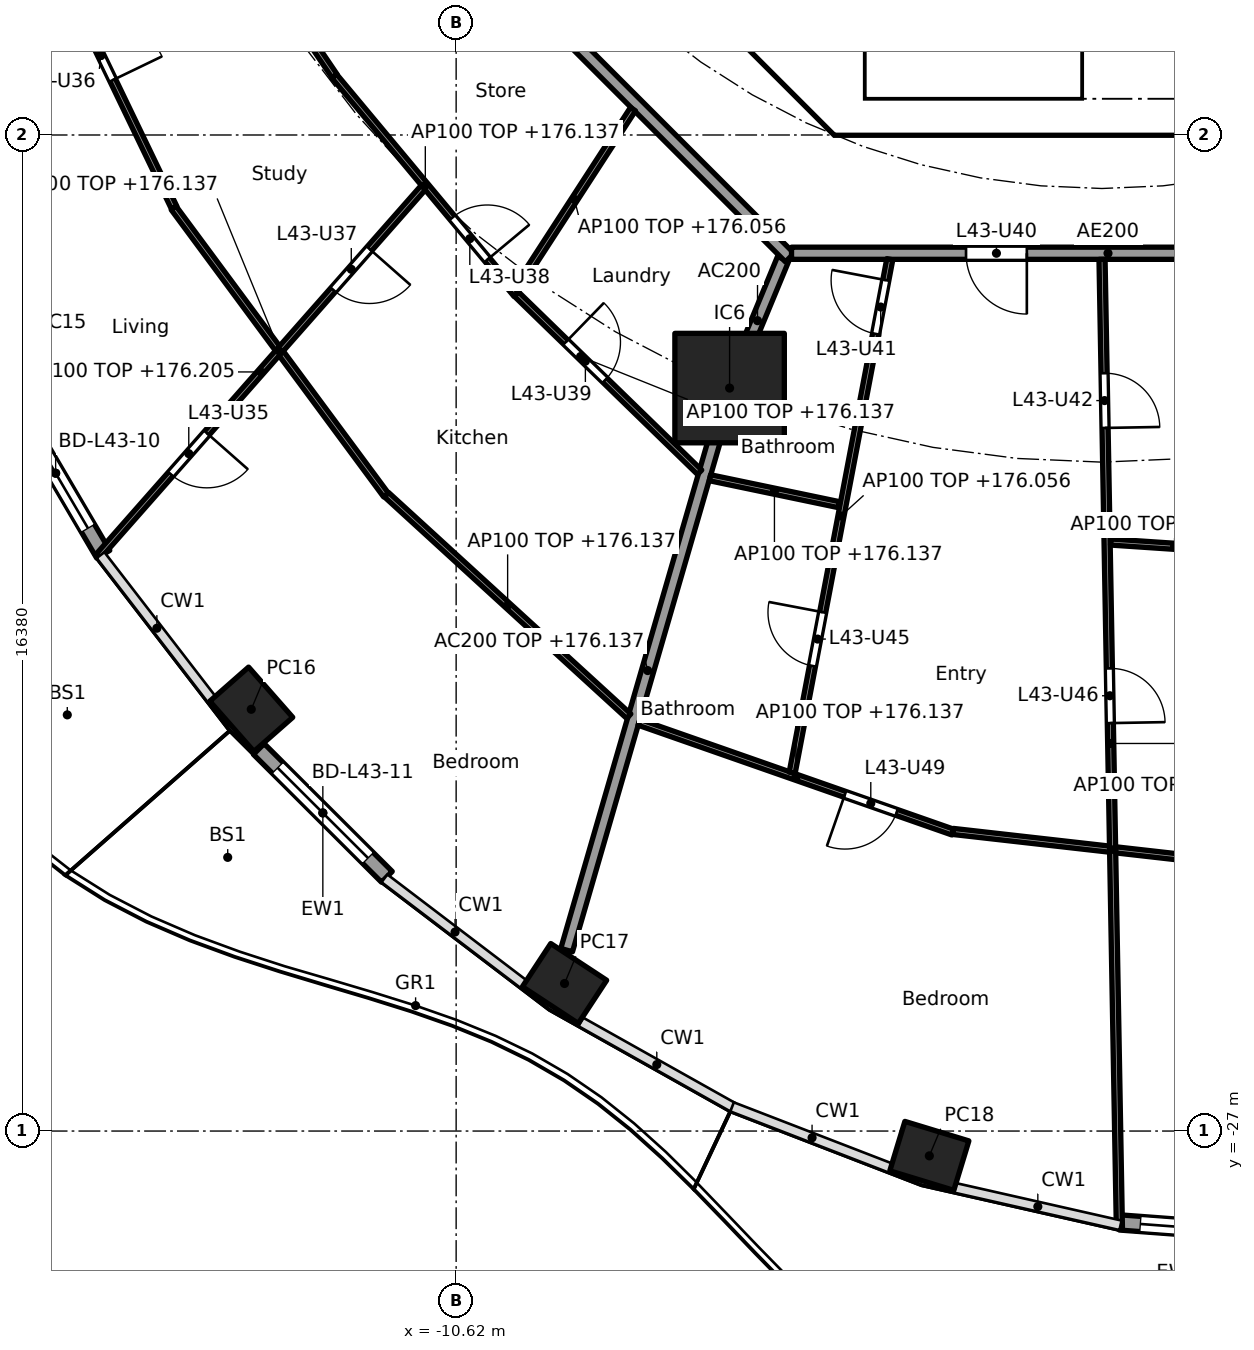
"""IFC4 building model, lengths in metres.
Left out: names, types, materials, properties, quantities, classifications, styles, units other than length and angle.
Written with IfcOpenShell. Run it as: python <this file> out.ifc"""

import sys

from ifc_helpers import new_model, si_unit, direction, frame, frame_2d, origin, origin_2d, place, context, subcontext, project, spatial, polyline, rectangle, hollow_rectangle, outline, extrude, element, fill, save


model = new_model("IFC4")
c1 = context("Model", 3, precision=1e-05, world=origin(), true_north=direction((0.0, 1.0)))
c2 = subcontext(c1, "Body", "Model", "MODEL_VIEW")
j1 = project(units=[si_unit("LENGTHUNIT", "METRE"), si_unit("PLANEANGLEUNIT", "RADIAN")], contexts=[c1])
p1 = place(None, origin())
s1 = spatial("IfcSite", under=j1, at=p1, CompositionType="ELEMENT")
p2 = place(p1, origin())
s2 = spatial("IfcBuilding", under=s1, at=p2, CompositionType="ELEMENT")
p3 = place(p2, frame((0.0, 0.0, 173.3)))
s3 = spatial("IfcBuildingStorey", under=s2, at=p3, CompositionType="ELEMENT", Elevation=173.3)
for number, where, z_axis, x_axis in (
    (1, (-13.989, -20.064, 0.0), (0.0, 0.0, 1.0), (0.66, -0.751, 0.0)),
    (2, (-8.837, -24.573, 0.0), (0.0, 0.0, 1.0), (0.836, -0.549, 0.0)),
    (3, (-2.838, -27.408, 0.0), (0.0, 0.0, 1.0), (0.957, -0.292, 0.0)),
):
    element("IfcColumn", number, at=place(p3, frame(where, z_axis=z_axis, x_axis=x_axis)), inside=s3, PredefinedType="COLUMN", context=c2, shape_type="SweptSolid", body=[
        extrude(hollow_rectangle(XDim=1.1, YDim=0.85, WallThickness=0.036, at=origin_2d()), origin(), (0.0, 0.0, 1.0), 3.7),
    ])
p4 = place(p3, frame((-6.123, -14.782, 0.0), z_axis=(0.0, 0.0, 1.0), x_axis=(1.0, 0.0, 0.0)))
e4 = element("IfcColumn", 4, at=p4, inside=s3, PredefinedType="COLUMN", context=c2, shape_type="SweptSolid", body=[
    extrude(rectangle(XDim=1.8, YDim=1.8, at=origin_2d()), origin(), (0.0, 0.0, 1.0), 3.7),
])
p5 = place(p3, frame((-16.424, -17.515, 0.0), z_axis=(0.0, 0.0, 1.0), x_axis=(-0.506309086483, 0.862352079458, 0.0)))
e5 = element("IfcWall", 5, at=p5, inside=s3, PredefinedType="SOLIDWALL", context=c2, shape_type="SweptSolid", body=[
    extrude(rectangle(XDim=3.092, YDim=0.25, at=frame_2d((1.546, 0.0))), origin(), (0.0, 0.0, 1.0), 3.44),
])
p6 = place(p5, frame((0.496, 0.0, 0.0)))
e6 = element("IfcOpeningElement", 6, at=p6, cuts=e5, PredefinedType="OPENING", context=c2, shape_type="SweptSolid", body=[
    extrude(rectangle(XDim=2.1, YDim=2.4, at=frame_2d((1.05, 1.2))), frame((0.0, 0.135, 0.0), z_axis=(0.0, -1.0, 0.0), x_axis=(1.0, 0.0, 0.0)), (0.0, 0.0, 1.0), 0.27),
])
p7 = place(p3, frame((-11.759, -22.82, 0.0), z_axis=(0.0, 0.0, 1.0), x_axis=(-0.707844845069, 0.706367946122, 0.0)))
e7 = element("IfcWall", 7, at=p7, inside=s3, PredefinedType="SOLIDWALL", context=c2, shape_type="SweptSolid", body=[
    extrude(rectangle(XDim=2.976, YDim=0.25, at=frame_2d((1.488, 0.0))), origin(), (0.0, 0.0, 1.0), 3.44),
])
p8 = place(p7, frame((0.438, 0.0, 0.0)))
e8 = element("IfcOpeningElement", 8, at=p8, cuts=e7, PredefinedType="OPENING", context=c2, shape_type="SweptSolid", body=[
    extrude(rectangle(XDim=2.1, YDim=2.4, at=frame_2d((1.05, 1.2))), frame((0.0, 0.135, 0.0), z_axis=(0.0, -1.0, 0.0), x_axis=(1.0, 0.0, 0.0)), (0.0, 0.0, 1.0), 0.27),
])
p9 = place(p3, frame((3.061, -28.709, 0.0), z_axis=(0.0, 0.0, 1.0), x_axis=(-0.997232064422, 0.074351931305, 0.0)))
e9 = element("IfcWall", 9, at=p9, inside=s3, PredefinedType="SOLIDWALL", context=c2, shape_type="SweptSolid", body=[
    extrude(rectangle(XDim=2.771, YDim=0.25, at=frame_2d((1.386, 0.0))), origin(), (0.0, 0.0, 1.0), 3.44),
])
p10 = place(p9, frame((0.336, 0.0, 0.0)))
e10 = element("IfcOpeningElement", 10, at=p10, cuts=e9, PredefinedType="OPENING", context=c2, shape_type="SweptSolid", body=[
    extrude(rectangle(XDim=2.1, YDim=2.4, at=frame_2d((1.05, 1.2))), frame((0.0, 0.135, 0.0), z_axis=(0.0, -1.0, 0.0), x_axis=(1.0, 0.0, 0.0)), (0.0, 0.0, 1.0), 0.27),
])
p11 = place(p3, frame((-9.988, -4.613, 0.0), z_axis=(0.0, 0.0, 1.0), x_axis=(0.707106781187, -0.707106781187, 0.0)))
e11 = element("IfcWall", 11, at=p11, inside=s3, PredefinedType="SHEAR", context=c2, shape_type="SweptSolid", body=[
    extrude(rectangle(XDim=7.602, YDim=0.6, at=frame_2d((3.801, 0.0))), origin(), (0.0, 0.0, 1.0), 3.44),
])
p12 = place(p11, frame((6.151, 0.0, 0.0)))
e12 = element("IfcOpeningElement", 12, at=p12, cuts=e11, PredefinedType="OPENING", context=c2, shape_type="SweptSolid", body=[
    extrude(rectangle(XDim=1.1, YDim=2.1, at=frame_2d((0.55, 1.05))), frame((0.0, 0.31, 0.0), z_axis=(0.0, -1.0, 0.0), x_axis=(1.0, 0.0, 0.0)), (0.0, 0.0, 1.0), 0.62),
])
p13 = place(p3, origin())
e13 = element("IfcWall", 13, at=p13, inside=s3, PredefinedType="SHEAR", context=c2, shape_type="SweptSolid", body=[
    extrude(outline(polyline([(-4.152, -10.025), (4.152, -10.025), (4.401, -9.776), (4.825, -10.2), (4.401, -10.625), (-4.401, -10.625), (-4.825, -10.2), (-4.401, -9.776), (-4.152, -10.025)])), origin(), (0.0, 0.0, 1.0), 3.44),
])
p14 = place(p3, origin())
e14 = element("IfcWall", 14, at=p14, inside=s3, PredefinedType="SOLIDWALL", context=c2, shape_type="SweptSolid", body=[
    extrude(outline(polyline([(-3.9, -10.025), (-4.1, -10.025), (-4.1, -7.025), (-3.9, -7.025), (-3.9, -10.025)])), origin(), (0.0, 0.0, 1.0), 3.44),
])
p15 = place(p3, frame((-5.243, -12.657, 0.0), z_axis=(0.0, 0.0, 1.0), x_axis=(-0.382707856524, -0.923869415315, 0.0)))
e15 = element("IfcWall", 15, at=p15, inside=s3, PredefinedType="PARTITIONING", context=c2, shape_type="SweptSolid", body=[
    extrude(rectangle(XDim=2.2, YDim=0.2, at=frame_2d((1.1, 0.0))), origin(), (0.0, 0.0, 1.0), 3.44),
])
p16 = place(p3, frame((-6.137, -14.83, 0.0), z_axis=(0.0, 0.0, 1.0), x_axis=(-0.278461169897, -0.96044748782, 0.0)))
e16 = element("IfcWall", 16, at=p16, inside=s3, PredefinedType="PARTITIONING", context=c2, shape_type="SweptSolid", body=[
    extrude(rectangle(XDim=9.573, YDim=0.2, at=frame_2d((4.787, 0.0))), origin(), (0.0, 0.0, 1.0), 2.837),
])
p17 = place(p3, frame((-12.635, -5.134, 0.0), z_axis=(0.0, 0.0, 1.0), x_axis=(0.707106781187, -0.707106781187, 0.0)))
e17 = element("IfcWall", 17, at=p17, inside=s3, PredefinedType="PARTITIONING", context=c2, shape_type="SweptSolid", body=[
    extrude(rectangle(XDim=10.609, YDim=0.2, at=frame_2d((5.305, 0.0))), origin(), (0.0, 0.0, 1.0), 3.44),
])
p18 = place(p3, frame((-5.104, -12.565, 0.0), z_axis=(0.0, 0.0, 1.0), x_axis=(1.0, 0.0, 0.0)))
e18 = element("IfcWall", 18, at=p18, inside=s3, PredefinedType="PARTITIONING", context=c2, shape_type="SweptSolid", body=[
    extrude(rectangle(XDim=10.409, YDim=0.2, at=frame_2d((5.205, 0.0))), origin(), (0.0, 0.0, 1.0), 3.44),
])
p19 = place(p18, frame((2.87, 0.0, 0.0)))
e19 = element("IfcOpeningElement", 19, at=p19, cuts=e18, PredefinedType="OPENING", context=c2, shape_type="SweptSolid", body=[
    extrude(rectangle(XDim=1.0, YDim=2.1, at=frame_2d((0.5, 1.05))), frame((0.0, 0.11, 0.0), z_axis=(0.0, -1.0, 0.0), x_axis=(1.0, 0.0, 0.0)), (0.0, 0.0, 1.0), 0.22),
])
p20 = place(p3, frame((-14.952, -6.208, 0.0), z_axis=(0.0, 0.0, 1.0), x_axis=(0.561064907171, -0.827771810308, 0.0)))
e20 = element("IfcWall", 20, at=p20, inside=s3, PredefinedType="PARTITIONING", context=c2, shape_type="SweptSolid", body=[
    extrude(rectangle(XDim=4.159, YDim=0.1, at=frame_2d((2.079, 0.0))), origin(), (0.0, 0.0, 1.0), 3.44),
])
p21 = place(p3, frame((-17.669, -6.809, 0.0), z_axis=(0.0, 0.0, 1.0), x_axis=(0.434040130629, -0.900893536997, 0.0)))
e21 = element("IfcWall", 21, at=p21, inside=s3, PredefinedType="PARTITIONING", context=c2, shape_type="SweptSolid", body=[
    extrude(rectangle(XDim=5.558, YDim=0.1, at=frame_2d((2.779, 0.0))), origin(), (0.0, 0.0, 1.0), 3.44),
])
p22 = place(p21, frame((2.329, 0.0, 0.0)))
e22 = element("IfcOpeningElement", 22, at=p22, cuts=e21, PredefinedType="OPENING", context=c2, shape_type="SweptSolid", body=[
    extrude(rectangle(XDim=0.9, YDim=2.1, at=frame_2d((0.45, 1.05))), frame((0.0, 0.06, 0.0), z_axis=(0.0, -1.0, 0.0), x_axis=(1.0, 0.0, 0.0)), (0.0, 0.0, 1.0), 0.12),
])
p23 = place(p3, frame((-12.623, -9.653, 0.0), z_axis=(0.0, 0.0, 1.0), x_axis=(0.640297481347, -0.768127030758, 0.0)))
e23 = element("IfcWall", 23, at=p23, inside=s3, PredefinedType="PARTITIONING", context=c2, shape_type="SweptSolid", body=[
    extrude(rectangle(XDim=4.672, YDim=0.1, at=frame_2d((2.336, 0.0))), origin(), (0.0, 0.0, 1.0), 2.837),
])
p24 = place(p23, frame((3.029, 0.0, 0.0)))
e24 = element("IfcOpeningElement", 24, at=p24, cuts=e23, PredefinedType="OPENING", context=c2, shape_type="SweptSolid", body=[
    extrude(rectangle(XDim=0.9, YDim=2.1, at=frame_2d((0.45, 1.05))), frame((0.0, 0.06, 0.0), z_axis=(0.0, -1.0, 0.0), x_axis=(1.0, 0.0, 0.0)), (0.0, 0.0, 1.0), 0.12),
])
p25 = place(p3, frame((-15.265, -11.821, 0.0), z_axis=(0.0, 0.0, 1.0), x_axis=(0.594711348772, -0.803939308432, 0.0)))
e25 = element("IfcWall", 25, at=p25, inside=s3, PredefinedType="PARTITIONING", context=c2, shape_type="SweptSolid", body=[
    extrude(rectangle(XDim=5.872, YDim=0.1, at=frame_2d((2.936, 0.0))), origin(), (0.0, 0.0, 1.0), 2.837),
])
p26 = place(p3, frame((-11.16, -11.485, 0.0), z_axis=(0.0, 0.0, 1.0), x_axis=(-0.661275898802, -0.750142776852, 0.0)))
e26 = element("IfcWall", 26, at=p26, inside=s3, PredefinedType="PARTITIONING", context=c2, shape_type="SweptSolid", body=[
    extrude(rectangle(XDim=8.083, YDim=0.1, at=frame_2d((4.041, 0.0))), origin(), (0.0, 0.0, 1.0), 2.905),
])
p27 = place(p26, frame((5.382, 0.0, 0.0)))
e27 = element("IfcOpeningElement", 27, at=p27, cuts=e26, PredefinedType="OPENING", context=c2, shape_type="SweptSolid", body=[
    extrude(rectangle(XDim=0.9, YDim=2.1, at=frame_2d((0.45, 1.05))), frame((0.0, 0.06, 0.0), z_axis=(0.0, -1.0, 0.0), x_axis=(1.0, 0.0, 0.0)), (0.0, 0.0, 1.0), 0.12),
])
p28 = place(p26, frame((1.341, 0.0, 0.0)))
e28 = element("IfcOpeningElement", 28, at=p28, cuts=e26, PredefinedType="OPENING", context=c2, shape_type="SweptSolid", body=[
    extrude(rectangle(XDim=0.9, YDim=2.1, at=frame_2d((0.45, 1.05))), frame((0.0, 0.06, 0.0), z_axis=(0.0, -1.0, 0.0), x_axis=(1.0, 0.0, 0.0)), (0.0, 0.0, 1.0), 0.12),
])
p29 = place(p3, frame((-7.712, -10.195, 0.0), z_axis=(0.0, 0.0, 1.0), x_axis=(-0.544170086001, -0.838974920663, 0.0)))
e29 = element("IfcWall", 29, at=p29, inside=s3, PredefinedType="PARTITIONING", context=c2, shape_type="SweptSolid", body=[
    extrude(rectangle(XDim=3.535, YDim=0.1, at=frame_2d((1.768, 0.0))), origin(), (0.0, 0.0, 1.0), 2.756),
])
p30 = place(p3, frame((-9.627, -13.238, 0.0), z_axis=(0.0, 0.0, 1.0), x_axis=(0.716919058692, -0.697156412352, 0.0)))
e30 = element("IfcWall", 30, at=p30, inside=s3, PredefinedType="PARTITIONING", context=c2, shape_type="SweptSolid", body=[
    extrude(rectangle(XDim=4.2, YDim=0.1, at=frame_2d((2.1, 0.0))), origin(), (0.0, 0.0, 1.0), 2.837),
])
p31 = place(p30, frame((1.13, 0.0, 0.0)))
e31 = element("IfcOpeningElement", 31, at=p31, cuts=e30, PredefinedType="OPENING", context=c2, shape_type="SweptSolid", body=[
    extrude(rectangle(XDim=0.9, YDim=2.1, at=frame_2d((0.45, 1.05))), frame((0.0, 0.06, 0.0), z_axis=(0.0, -1.0, 0.0), x_axis=(1.0, 0.0, 0.0)), (0.0, 0.0, 1.0), 0.12),
])
p32 = place(p3, frame((-11.766, -16.535, 0.0), z_axis=(0.0, 0.0, 1.0), x_axis=(0.73807320557, -0.674720640872, 0.0)))
e32 = element("IfcWall", 32, at=p32, inside=s3, PredefinedType="PARTITIONING", context=c2, shape_type="SweptSolid", body=[
    extrude(rectangle(XDim=5.399, YDim=0.1, at=frame_2d((2.699, 0.0))), origin(), (0.0, 0.0, 1.0), 2.837),
])
p33 = place(p3, frame((-6.447, -16.256, 0.0), z_axis=(0.0, 0.0, 1.0), x_axis=(0.978909151576, -0.204296042448, 0.0)))
e33 = element("IfcWall", 33, at=p33, inside=s3, PredefinedType="PARTITIONING", context=c2, shape_type="SweptSolid", body=[
    extrude(rectangle(XDim=2.168, YDim=0.1, at=frame_2d((1.084, 0.0))), origin(), (0.0, 0.0, 1.0), 2.837),
])
p34 = place(p3, frame((-7.613, -20.278, 0.0), z_axis=(0.0, 0.0, 1.0), x_axis=(0.943918212431, -0.330179357684, 0.0)))
e34 = element("IfcWall", 34, at=p34, inside=s3, PredefinedType="PARTITIONING", context=c2, shape_type="SweptSolid", body=[
    extrude(rectangle(XDim=5.467, YDim=0.1, at=frame_2d((2.734, 0.0))), origin(), (0.0, 0.0, 1.0), 2.837),
])
p35 = place(p34, frame((3.588, 0.0, 0.0)))
e35 = element("IfcOpeningElement", 35, at=p35, cuts=e34, PredefinedType="OPENING", context=c2, shape_type="SweptSolid", body=[
    extrude(rectangle(XDim=0.9, YDim=2.1, at=frame_2d((0.45, 1.05))), frame((0.0, 0.06, 0.0), z_axis=(0.0, -1.0, 0.0), x_axis=(1.0, 0.0, 0.0)), (0.0, 0.0, 1.0), 0.12),
])
p36 = place(p3, frame((-3.488, -12.663, 0.0), z_axis=(0.0, 0.0, 1.0), x_axis=(-0.186783185485, -0.982401161247, 0.0)))
e36 = element("IfcWall", 36, at=p36, inside=s3, PredefinedType="PARTITIONING", context=c2, shape_type="SweptSolid", body=[
    extrude(rectangle(XDim=8.595, YDim=0.1, at=frame_2d((4.298, 0.0))), origin(), (0.0, 0.0, 1.0), 2.756),
])
p37 = place(p36, frame((0.35, 0.0, 0.0)))
e37 = element("IfcOpeningElement", 37, at=p37, cuts=e36, PredefinedType="OPENING", context=c2, shape_type="SweptSolid", body=[
    extrude(rectangle(XDim=0.9, YDim=2.1, at=frame_2d((0.45, 1.05))), frame((0.0, 0.06, 0.0), z_axis=(0.0, -1.0, 0.0), x_axis=(1.0, 0.0, 0.0)), (0.0, 0.0, 1.0), 0.12),
])
p38 = place(p36, frame((5.908, 0.0, 0.0)))
e38 = element("IfcOpeningElement", 38, at=p38, cuts=e36, PredefinedType="OPENING", context=c2, shape_type="SweptSolid", body=[
    extrude(rectangle(XDim=0.9, YDim=2.1, at=frame_2d((0.45, 1.05))), frame((0.0, 0.06, 0.0), z_axis=(0.0, -1.0, 0.0), x_axis=(1.0, 0.0, 0.0)), (0.0, 0.0, 1.0), 0.12),
])
p39 = place(p3, frame((-2.449, -22.073, 0.0), z_axis=(0.0, 0.0, 1.0), x_axis=(0.993660315081, -0.112424099879, 0.0)))
e39 = element("IfcWall", 39, at=p39, inside=s3, PredefinedType="PARTITIONING", context=c2, shape_type="SweptSolid", body=[
    extrude(rectangle(XDim=5.325, YDim=0.1, at=frame_2d((2.662, 0.0))), origin(), (0.0, 0.0, 1.0), 2.837),
])
p40 = place(p3, frame((0.002, -12.665, 0.0), z_axis=(0.0, 0.0, 1.0), x_axis=(0.01792079652, -0.999839409631, 0.0)))
e40 = element("IfcWall", 40, at=p40, inside=s3, PredefinedType="PARTITIONING", context=c2, shape_type="SweptSolid", body=[
    extrude(rectangle(XDim=15.926, YDim=0.1, at=frame_2d((7.963, 0.0))), origin(), (0.0, 0.0, 1.0), 2.756),
])
p41 = place(p40, frame((1.873, 0.0, 0.0)))
e41 = element("IfcOpeningElement", 41, at=p41, cuts=e40, PredefinedType="OPENING", context=c2, shape_type="SweptSolid", body=[
    extrude(rectangle(XDim=0.9, YDim=2.1, at=frame_2d((0.45, 1.05))), frame((0.0, 0.06, 0.0), z_axis=(0.0, -1.0, 0.0), x_axis=(1.0, 0.0, 0.0)), (0.0, 0.0, 1.0), 0.12),
])
p42 = place(p40, frame((6.728, 0.0, 0.0)))
e42 = element("IfcOpeningElement", 42, at=p42, cuts=e40, PredefinedType="OPENING", context=c2, shape_type="SweptSolid", body=[
    extrude(rectangle(XDim=0.9, YDim=2.1, at=frame_2d((0.45, 1.05))), frame((0.0, 0.06, 0.0), z_axis=(0.0, -1.0, 0.0), x_axis=(1.0, 0.0, 0.0)), (0.0, 0.0, 1.0), 0.12),
])
p43 = place(p3, frame((0.145, -17.314, 0.0), z_axis=(0.0, 0.0, 1.0), x_axis=(0.997756833447, -0.06694252243, 0.0)))
e43 = element("IfcWall", 43, at=p43, inside=s3, PredefinedType="PARTITIONING", context=c2, shape_type="SweptSolid", body=[
    extrude(rectangle(XDim=2.104, YDim=0.1, at=frame_2d((1.052, 0.0))), origin(), (0.0, 0.0, 1.0), 2.837),
])
p44 = place(p6, origin())
e44 = element("IfcDoor", 44, at=p44, inside=s3, OperationType="SLIDING_TO_LEFT", PredefinedType="DOOR", context=c2, shape_type="SweptSolid", body=[
    extrude(rectangle(XDim=2.1, YDim=2.4, at=frame_2d((1.05, 1.2))), frame((0.0, 0.025, 0.0), z_axis=(0.0, -1.0, 0.0), x_axis=(1.0, 0.0, 0.0)), (0.0, 0.0, 1.0), 0.05),
])
fill(e6, e44)
p45 = place(p8, origin())
e45 = element("IfcDoor", 45, at=p45, inside=s3, OperationType="SLIDING_TO_LEFT", PredefinedType="DOOR", context=c2, shape_type="SweptSolid", body=[
    extrude(rectangle(XDim=2.1, YDim=2.4, at=frame_2d((1.05, 1.2))), frame((0.0, 0.025, 0.0), z_axis=(0.0, -1.0, 0.0), x_axis=(1.0, 0.0, 0.0)), (0.0, 0.0, 1.0), 0.05),
])
fill(e8, e45)
p46 = place(p10, origin())
e46 = element("IfcDoor", 46, at=p46, inside=s3, OperationType="SLIDING_TO_LEFT", PredefinedType="DOOR", context=c2, shape_type="SweptSolid", body=[
    extrude(rectangle(XDim=2.1, YDim=2.4, at=frame_2d((1.05, 1.2))), frame((0.0, 0.025, 0.0), z_axis=(0.0, -1.0, 0.0), x_axis=(1.0, 0.0, 0.0)), (0.0, 0.0, 1.0), 0.05),
])
fill(e10, e46)
p47 = place(p12, origin())
e47 = element("IfcDoor", 47, at=p47, inside=s3, OperationType="SINGLE_SWING_RIGHT", PredefinedType="DOOR", context=c2, shape_type="SweptSolid", body=[
    extrude(rectangle(XDim=1.1, YDim=2.1, at=frame_2d((0.55, 1.05))), frame((0.0, 0.025, 0.0), z_axis=(0.0, -1.0, 0.0), x_axis=(1.0, 0.0, 0.0)), (0.0, 0.0, 1.0), 0.05),
])
fill(e12, e47)
p48 = place(p27, origin())
e48 = element("IfcDoor", 48, at=p48, inside=s3, OperationType="SINGLE_SWING_LEFT", PredefinedType="DOOR", context=c2, shape_type="SweptSolid", body=[
    extrude(rectangle(XDim=0.9, YDim=2.1, at=frame_2d((0.45, 1.05))), frame((0.0, 0.025, 0.0), z_axis=(0.0, -1.0, 0.0), x_axis=(1.0, 0.0, 0.0)), (0.0, 0.0, 1.0), 0.05),
])
fill(e27, e48)
p49 = place(p22, origin())
e49 = element("IfcDoor", 49, at=p49, inside=s3, OperationType="SINGLE_SWING_RIGHT", PredefinedType="DOOR", context=c2, shape_type="SweptSolid", body=[
    extrude(rectangle(XDim=0.9, YDim=2.1, at=frame_2d((0.45, 1.05))), frame((0.0, 0.025, 0.0), z_axis=(0.0, -1.0, 0.0), x_axis=(1.0, 0.0, 0.0)), (0.0, 0.0, 1.0), 0.05),
])
fill(e22, e49)
p50 = place(p28, origin())
e50 = element("IfcDoor", 50, at=p50, inside=s3, OperationType="SINGLE_SWING_LEFT", PredefinedType="DOOR", context=c2, shape_type="SweptSolid", body=[
    extrude(rectangle(XDim=0.9, YDim=2.1, at=frame_2d((0.45, 1.05))), frame((0.0, 0.025, 0.0), z_axis=(0.0, -1.0, 0.0), x_axis=(1.0, 0.0, 0.0)), (0.0, 0.0, 1.0), 0.05),
])
fill(e28, e50)
p51 = place(p24, origin())
e51 = element("IfcDoor", 51, at=p51, inside=s3, OperationType="SINGLE_SWING_RIGHT", PredefinedType="DOOR", context=c2, shape_type="SweptSolid", body=[
    extrude(rectangle(XDim=0.9, YDim=2.1, at=frame_2d((0.45, 1.05))), frame((0.0, 0.025, 0.0), z_axis=(0.0, -1.0, 0.0), x_axis=(1.0, 0.0, 0.0)), (0.0, 0.0, 1.0), 0.05),
])
fill(e24, e51)
p52 = place(p31, origin())
e52 = element("IfcDoor", 52, at=p52, inside=s3, OperationType="SINGLE_SWING_LEFT", PredefinedType="DOOR", context=c2, shape_type="SweptSolid", body=[
    extrude(rectangle(XDim=0.9, YDim=2.1, at=frame_2d((0.45, 1.05))), frame((0.0, 0.025, 0.0), z_axis=(0.0, -1.0, 0.0), x_axis=(1.0, 0.0, 0.0)), (0.0, 0.0, 1.0), 0.05),
])
fill(e31, e52)
p53 = place(p19, frame((1.0, 0.0, 0.0), x_axis=(-1.0, 0.0, 0.0)))
e53 = element("IfcDoor", 53, at=p53, inside=s3, OperationType="SINGLE_SWING_LEFT", PredefinedType="DOOR", context=c2, shape_type="SweptSolid", body=[
    extrude(rectangle(XDim=1.0, YDim=2.1, at=frame_2d((0.5, 1.05))), frame((0.0, 0.025, 0.0), z_axis=(0.0, -1.0, 0.0), x_axis=(1.0, 0.0, 0.0)), (0.0, 0.0, 1.0), 0.05),
])
fill(e19, e53)
p54 = place(p37, frame((0.9, 0.0, 0.0), x_axis=(-1.0, 0.0, 0.0)))
e54 = element("IfcDoor", 54, at=p54, inside=s3, OperationType="SINGLE_SWING_RIGHT", PredefinedType="DOOR", context=c2, shape_type="SweptSolid", body=[
    extrude(rectangle(XDim=0.9, YDim=2.1, at=frame_2d((0.45, 1.05))), frame((0.0, 0.025, 0.0), z_axis=(0.0, -1.0, 0.0), x_axis=(1.0, 0.0, 0.0)), (0.0, 0.0, 1.0), 0.05),
])
fill(e37, e54)
p55 = place(p41, origin())
e55 = element("IfcDoor", 55, at=p55, inside=s3, OperationType="SINGLE_SWING_RIGHT", PredefinedType="DOOR", context=c2, shape_type="SweptSolid", body=[
    extrude(rectangle(XDim=0.9, YDim=2.1, at=frame_2d((0.45, 1.05))), frame((0.0, 0.025, 0.0), z_axis=(0.0, -1.0, 0.0), x_axis=(1.0, 0.0, 0.0)), (0.0, 0.0, 1.0), 0.05),
])
fill(e41, e55)
p56 = place(p38, frame((0.9, 0.0, 0.0), x_axis=(-1.0, 0.0, 0.0)))
e56 = element("IfcDoor", 56, at=p56, inside=s3, OperationType="SINGLE_SWING_RIGHT", PredefinedType="DOOR", context=c2, shape_type="SweptSolid", body=[
    extrude(rectangle(XDim=0.9, YDim=2.1, at=frame_2d((0.45, 1.05))), frame((0.0, 0.025, 0.0), z_axis=(0.0, -1.0, 0.0), x_axis=(1.0, 0.0, 0.0)), (0.0, 0.0, 1.0), 0.05),
])
fill(e38, e56)
p57 = place(p42, origin())
e57 = element("IfcDoor", 57, at=p57, inside=s3, OperationType="SINGLE_SWING_RIGHT", PredefinedType="DOOR", context=c2, shape_type="SweptSolid", body=[
    extrude(rectangle(XDim=0.9, YDim=2.1, at=frame_2d((0.45, 1.05))), frame((0.0, 0.025, 0.0), z_axis=(0.0, -1.0, 0.0), x_axis=(1.0, 0.0, 0.0)), (0.0, 0.0, 1.0), 0.05),
])
fill(e42, e57)
p58 = place(p35, frame((0.9, 0.0, 0.0), x_axis=(-1.0, 0.0, 0.0)))
e58 = element("IfcDoor", 58, at=p58, inside=s3, OperationType="SINGLE_SWING_RIGHT", PredefinedType="DOOR", context=c2, shape_type="SweptSolid", body=[
    extrude(rectangle(XDim=0.9, YDim=2.1, at=frame_2d((0.45, 1.05))), frame((0.0, 0.025, 0.0), z_axis=(0.0, -1.0, 0.0), x_axis=(1.0, 0.0, 0.0)), (0.0, 0.0, 1.0), 0.05),
])
fill(e35, e58)
save(model, sys.argv[1])
